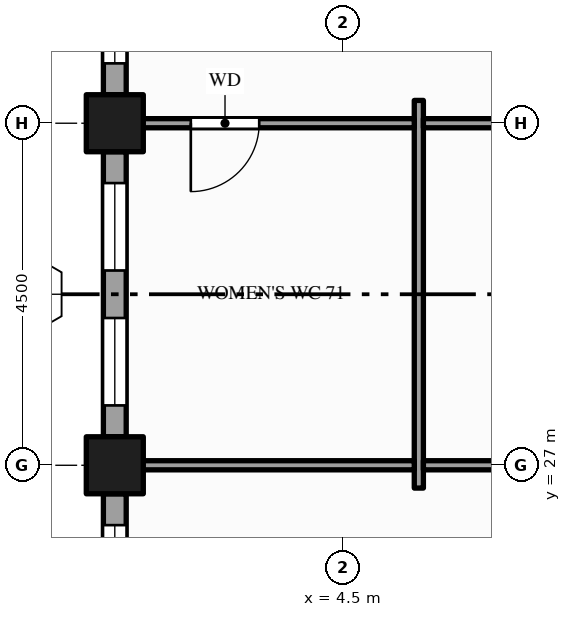
"""IFC4 building model, lengths in metres.
Left out: names, types, materials, properties, quantities, classifications, styles, units other than length and angle.
Written with IfcOpenShell. Run it as: python <this file> out.ifc"""

import sys

from ifc_helpers import new_model, si_unit, direction, frame, frame_2d, origin, origin_2d, place, context, subcontext, project, spatial, rectangle, hollow_rectangle, extrude, element, fill, save


model = new_model("IFC4")
c1 = context("Model", 3, precision=1e-05, world=origin(), true_north=direction((0.0, 1.0)))
c2 = subcontext(c1, "Body", "Model", "MODEL_VIEW")
j1 = project(units=[si_unit("LENGTHUNIT", "METRE"), si_unit("PLANEANGLEUNIT", "RADIAN")], contexts=[c1])
p1 = place(None, origin())
s1 = spatial("IfcSite", under=j1, at=p1, CompositionType="ELEMENT")
p2 = place(p1, origin())
s2 = spatial("IfcBuilding", under=s1, at=p2, CompositionType="ELEMENT")
p3 = place(p2, frame((0.0, 0.0, 227.0)))
s3 = spatial("IfcBuildingStorey", under=s2, at=p3, CompositionType="ELEMENT", Elevation=227.0)
for number, where, z_axis, x_axis in (
    (1, (1.5, 27.0, -0.15), (0.0, 0.0, 1.0), (1.0, 0.0, 0.0)),
    (2, (1.5, 31.5, -0.15), (0.0, 0.0, 1.0), (1.0, 0.0, 0.0)),
):
    element("IfcColumn", number, at=place(p3, frame(where, z_axis=z_axis, x_axis=x_axis)), inside=s3, PredefinedType="COLUMN", context=c2, shape_type="SweptSolid", body=[
        extrude(hollow_rectangle(XDim=0.75, YDim=0.75, WallThickness=0.036, at=origin_2d()), origin(), (0.0, 0.0, 1.0), 4.0),
    ])
p4 = place(p3, frame((1.5, 36.0, 0.0), z_axis=(0.0, 0.0, 1.0), x_axis=(0.0, -1.0, 0.0)))
e3 = element("IfcWall", 3, at=p4, inside=s3, PredefinedType="STANDARD", context=c2, shape_type="SweptSolid", body=[
    extrude(rectangle(XDim=4.125, YDim=0.3, at=frame_2d((2.062, 0.0))), origin(), (0.0, 0.0, 1.0), 3.157),
])
p5 = place(p4, frame((0.4, 0.0, 0.9)))
e4 = element("IfcOpeningElement", 4, at=p5, cuts=e3, PredefinedType="OPENING", context=c2, shape_type="SweptSolid", body=[
    extrude(rectangle(XDim=1.55, YDim=2.0, at=frame_2d((0.775, 1.0))), frame((0.0, 0.16, 0.0), z_axis=(0.0, -1.0, 0.0), x_axis=(1.0, 0.0, 0.0)), (0.0, 0.0, 1.0), 0.32),
])
p6 = place(p4, frame((2.562, 0.0, 0.9)))
e5 = element("IfcOpeningElement", 5, at=p6, cuts=e3, PredefinedType="OPENING", context=c2, shape_type="SweptSolid", body=[
    extrude(rectangle(XDim=1.15, YDim=2.0, at=frame_2d((0.575, 1.0))), frame((0.0, 0.16, 0.0), z_axis=(0.0, -1.0, 0.0), x_axis=(1.0, 0.0, 0.0)), (0.0, 0.0, 1.0), 0.32),
])
p7 = place(p3, frame((1.5, 31.125, 0.0), z_axis=(0.0, 0.0, 1.0), x_axis=(0.0, -1.0, 0.0)))
e6 = element("IfcWall", 6, at=p7, inside=s3, PredefinedType="STANDARD", context=c2, shape_type="SweptSolid", body=[
    extrude(rectangle(XDim=3.75, YDim=0.3, at=frame_2d((1.875, 0.0))), origin(), (0.0, 0.0, 1.0), 3.157),
])
p8 = place(p7, frame((0.413, 0.0, 0.9)))
e7 = element("IfcOpeningElement", 7, at=p8, cuts=e6, PredefinedType="OPENING", context=c2, shape_type="SweptSolid", body=[
    extrude(rectangle(XDim=1.15, YDim=2.0, at=frame_2d((0.575, 1.0))), frame((0.0, 0.16, 0.0), z_axis=(0.0, -1.0, 0.0), x_axis=(1.0, 0.0, 0.0)), (0.0, 0.0, 1.0), 0.32),
])
p9 = place(p7, frame((2.188, 0.0, 0.9)))
e8 = element("IfcOpeningElement", 8, at=p9, cuts=e6, PredefinedType="OPENING", context=c2, shape_type="SweptSolid", body=[
    extrude(rectangle(XDim=1.15, YDim=2.0, at=frame_2d((0.575, 1.0))), frame((0.0, 0.16, 0.0), z_axis=(0.0, -1.0, 0.0), x_axis=(1.0, 0.0, 0.0)), (0.0, 0.0, 1.0), 0.32),
])
p10 = place(p3, frame((1.5, 26.625, 0.0), z_axis=(0.0, 0.0, 1.0), x_axis=(0.0, -1.0, 0.0)))
e9 = element("IfcWall", 9, at=p10, inside=s3, PredefinedType="STANDARD", context=c2, shape_type="SweptSolid", body=[
    extrude(rectangle(XDim=3.75, YDim=0.3, at=frame_2d((1.875, 0.0))), origin(), (0.0, 0.0, 1.0), 3.157),
])
p11 = place(p10, frame((0.413, 0.0, 0.9)))
e10 = element("IfcOpeningElement", 10, at=p11, cuts=e9, PredefinedType="OPENING", context=c2, shape_type="SweptSolid", body=[
    extrude(rectangle(XDim=1.15, YDim=2.0, at=frame_2d((0.575, 1.0))), frame((0.0, 0.16, 0.0), z_axis=(0.0, -1.0, 0.0), x_axis=(1.0, 0.0, 0.0)), (0.0, 0.0, 1.0), 0.32),
])
p12 = place(p10, frame((2.188, 0.0, 0.9)))
e11 = element("IfcOpeningElement", 11, at=p12, cuts=e9, PredefinedType="OPENING", context=c2, shape_type="SweptSolid", body=[
    extrude(rectangle(XDim=1.15, YDim=2.0, at=frame_2d((0.575, 1.0))), frame((0.0, 0.16, 0.0), z_axis=(0.0, -1.0, 0.0), x_axis=(1.0, 0.0, 0.0)), (0.0, 0.0, 1.0), 0.32),
])
p13 = place(p3, frame((5.5, 26.7, 0.0), z_axis=(0.0, 0.0, 1.0), x_axis=(0.0, 1.0, 0.0)))
e12 = element("IfcWall", 12, at=p13, inside=s3, PredefinedType="PARTITIONING", context=c2, shape_type="SweptSolid", body=[
    extrude(rectangle(XDim=5.1, YDim=0.12, at=frame_2d((2.55, 0.0))), origin(), (0.0, 0.0, 1.0), 3.85),
])
p14 = place(p3, frame((1.65, 27.0, 0.0), z_axis=(0.0, 0.0, 1.0), x_axis=(1.0, 0.0, 0.0)))
e13 = element("IfcWall", 13, at=p14, inside=s3, PredefinedType="PARTITIONING", context=c2, shape_type="SweptSolid", body=[
    extrude(rectangle(XDim=3.79, YDim=0.12, at=frame_2d((1.895, 0.0))), origin(), (0.0, 0.0, 1.0), 2.87),
])
p15 = place(p3, frame((5.56, 27.0, 0.0), z_axis=(0.0, 0.0, 1.0), x_axis=(1.0, 0.0, 0.0)))
e14 = element("IfcWall", 14, at=p15, inside=s3, PredefinedType="PARTITIONING", context=c2, shape_type="SweptSolid", body=[
    extrude(rectangle(XDim=3.88, YDim=0.12, at=frame_2d((1.94, 0.0))), origin(), (0.0, 0.0, 1.0), 2.87),
])
p16 = place(p3, frame((1.65, 31.5, 0.0), z_axis=(0.0, 0.0, 1.0), x_axis=(1.0, 0.0, 0.0)))
e15 = element("IfcWall", 15, at=p16, inside=s3, PredefinedType="PARTITIONING", context=c2, shape_type="SweptSolid", body=[
    extrude(rectangle(XDim=3.79, YDim=0.12, at=frame_2d((1.895, 0.0))), origin(), (0.0, 0.0, 1.0), 2.87),
])
p17 = place(p16, frame((0.85, 0.0, 0.0)))
e16 = element("IfcOpeningElement", 16, at=p17, cuts=e15, PredefinedType="OPENING", context=c2, shape_type="SweptSolid", body=[
    extrude(rectangle(XDim=0.9, YDim=2.1, at=frame_2d((0.45, 1.05))), frame((0.0, 0.07, 0.0), z_axis=(0.0, -1.0, 0.0), x_axis=(1.0, 0.0, 0.0)), (0.0, 0.0, 1.0), 0.14),
])
p18 = place(p3, frame((5.56, 31.5, 0.0), z_axis=(0.0, 0.0, 1.0), x_axis=(1.0, 0.0, 0.0)))
e17 = element("IfcWall", 17, at=p18, inside=s3, PredefinedType="PARTITIONING", context=c2, shape_type="SweptSolid", body=[
    extrude(rectangle(XDim=3.88, YDim=0.12, at=frame_2d((1.94, 0.0))), origin(), (0.0, 0.0, 1.0), 2.87),
])
p19 = place(p18, frame((1.49, 0.0, 0.0)))
e18 = element("IfcOpeningElement", 18, at=p19, cuts=e17, PredefinedType="OPENING", context=c2, shape_type="SweptSolid", body=[
    extrude(rectangle(XDim=0.9, YDim=2.1, at=frame_2d((0.45, 1.05))), frame((0.0, 0.07, 0.0), z_axis=(0.0, -1.0, 0.0), x_axis=(1.0, 0.0, 0.0)), (0.0, 0.0, 1.0), 0.14),
])
p20 = place(p6, origin())
e19 = element("IfcWindow", 19, at=p20, inside=s3, PartitioningType="SINGLE_PANEL", PredefinedType="WINDOW", context=c2, shape_type="SweptSolid", body=[
    extrude(rectangle(XDim=1.15, YDim=2.0, at=frame_2d((0.575, 1.0))), frame((0.0, 0.03, 0.0), z_axis=(0.0, -1.0, 0.0), x_axis=(1.0, 0.0, 0.0)), (0.0, 0.0, 1.0), 0.06),
])
fill(e5, e19)
p21 = place(p8, origin())
e20 = element("IfcWindow", 20, at=p21, inside=s3, PartitioningType="SINGLE_PANEL", PredefinedType="WINDOW", context=c2, shape_type="SweptSolid", body=[
    extrude(rectangle(XDim=1.15, YDim=2.0, at=frame_2d((0.575, 1.0))), frame((0.0, 0.03, 0.0), z_axis=(0.0, -1.0, 0.0), x_axis=(1.0, 0.0, 0.0)), (0.0, 0.0, 1.0), 0.06),
])
fill(e7, e20)
p22 = place(p9, origin())
e21 = element("IfcWindow", 21, at=p22, inside=s3, PartitioningType="SINGLE_PANEL", PredefinedType="WINDOW", context=c2, shape_type="SweptSolid", body=[
    extrude(rectangle(XDim=1.15, YDim=2.0, at=frame_2d((0.575, 1.0))), frame((0.0, 0.03, 0.0), z_axis=(0.0, -1.0, 0.0), x_axis=(1.0, 0.0, 0.0)), (0.0, 0.0, 1.0), 0.06),
])
fill(e8, e21)
p23 = place(p11, origin())
e22 = element("IfcWindow", 22, at=p23, inside=s3, PartitioningType="SINGLE_PANEL", PredefinedType="WINDOW", context=c2, shape_type="SweptSolid", body=[
    extrude(rectangle(XDim=1.15, YDim=2.0, at=frame_2d((0.575, 1.0))), frame((0.0, 0.03, 0.0), z_axis=(0.0, -1.0, 0.0), x_axis=(1.0, 0.0, 0.0)), (0.0, 0.0, 1.0), 0.06),
])
fill(e10, e22)
p24 = place(p17, origin())
e23 = element("IfcDoor", 23, at=p24, inside=s3, OperationType="SINGLE_SWING_LEFT", PredefinedType="DOOR", context=c2, shape_type="SweptSolid", body=[
    extrude(rectangle(XDim=0.9, YDim=2.1, at=frame_2d((0.45, 1.05))), frame((0.0, 0.025, 0.0), z_axis=(0.0, -1.0, 0.0), x_axis=(1.0, 0.0, 0.0)), (0.0, 0.0, 1.0), 0.05),
])
fill(e16, e23)
save(model, sys.argv[1])
